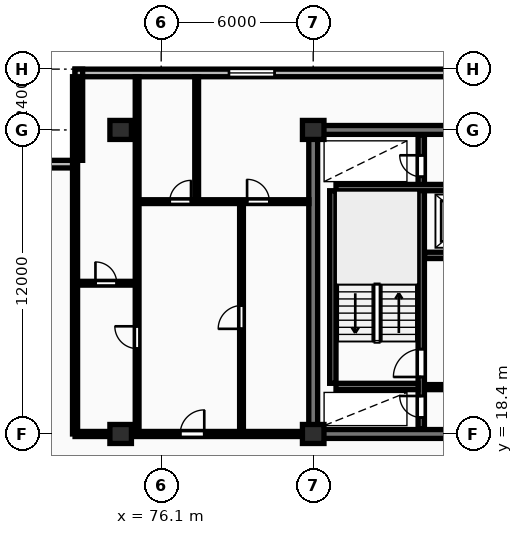
"""IFC4 building model, lengths in metres.
Left out: names, types, materials, properties, quantities, classifications, styles, units other than length and angle.
Written with IfcOpenShell. Run it as: python <this file> out.ifc"""

import sys

from ifc_helpers import new_model, si_unit, direction, frame, frame_2d, origin, origin_2d, place, context, subcontext, project, spatial, rectangle, extrude, element, fill, save


model = new_model("IFC4")
c1 = context("Model", 3, precision=1e-05, world=origin(), true_north=direction((0.0, 1.0)))
c2 = subcontext(c1, "Body", "Model", "MODEL_VIEW")
j1 = project(units=[si_unit("LENGTHUNIT", "METRE"), si_unit("PLANEANGLEUNIT", "RADIAN")], contexts=[c1])
p1 = place(None, origin())
s1 = spatial("IfcSite", under=j1, at=p1, CompositionType="ELEMENT")
p2 = place(p1, origin())
s2 = spatial("IfcBuilding", under=s1, at=p2, CompositionType="ELEMENT")
p3 = place(p2, frame((0.0, 0.0, 87.3)))
s3 = spatial("IfcBuildingStorey", under=s2, at=p3, CompositionType="ELEMENT", Elevation=87.3)
for number, where, z_axis, x_axis in (
    (1, (74.5, 18.4, 0.0), (0.0, 0.0, 1.0), (1.0, 0.0, 0.0)),
    (2, (74.5, 30.4, 0.0), (0.0, 0.0, 1.0), (1.0, 0.0, 0.0)),
    (3, (82.1, 18.4, 0.0), (0.0, 0.0, 1.0), (1.0, 0.0, 0.0)),
    (4, (82.1, 30.4, 0.0), (0.0, 0.0, 1.0), (1.0, 0.0, 0.0)),
):
    element("IfcColumn", number, at=place(p3, frame(where, z_axis=z_axis, x_axis=x_axis)), inside=s3, PredefinedType="COLUMN", context=c2, shape_type="SweptSolid", body=[
        extrude(rectangle(XDim=0.85, YDim=0.75, at=origin_2d()), origin(), (0.0, 0.0, 1.0), 3.25),
    ])
p4 = place(p3, frame((130.7, 32.65, 0.0), z_axis=(0.0, 0.0, 1.0), x_axis=(-1.0, 0.0, 0.0)))
e5 = element("IfcWall", 5, at=p4, inside=s3, PredefinedType="STANDARD", context=c2, shape_type="SweptSolid", body=[
    extrude(rectangle(XDim=58.0, YDim=0.3, at=frame_2d((29.0, 0.0))), origin(), (0.0, 0.0, 1.0), 2.97),
])
p5 = place(p4, frame((50.125, 0.0, 0.85)))
e6 = element("IfcOpeningElement", 6, at=p5, cuts=e5, PredefinedType="OPENING", context=c2, shape_type="SweptSolid", body=[
    extrude(rectangle(XDim=1.8, YDim=1.8, at=frame_2d((0.9, 0.9))), frame((0.0, 0.16, 0.0), z_axis=(0.0, -1.0, 0.0), x_axis=(1.0, 0.0, 0.0)), (0.0, 0.0, 1.0), 0.32),
])
p6 = place(p4, frame((6.775, 0.0, 0.85)))
e7 = element("IfcOpeningElement", 7, at=p6, cuts=e5, PredefinedType="OPENING", context=c2, shape_type="SweptSolid", body=[
    extrude(rectangle(XDim=1.8, YDim=1.8, at=frame_2d((0.9, 0.9))), frame((0.0, 0.16, 0.0), z_axis=(0.0, -1.0, 0.0), x_axis=(1.0, 0.0, 0.0)), (0.0, 0.0, 1.0), 0.32),
])
p7 = place(p3, frame((72.85, 32.8, 0.0), z_axis=(0.0, 0.0, 1.0), x_axis=(0.0, -1.0, 0.0)))
e8 = element("IfcWall", 8, at=p7, inside=s3, PredefinedType="STANDARD", context=c2, shape_type="SweptSolid", body=[
    extrude(rectangle(XDim=3.6, YDim=0.3, at=frame_2d((1.8, 0.0))), origin(), (0.0, 0.0, 1.0), 2.97),
])
p8 = place(p3, frame((72.7, 29.05, 0.0), z_axis=(0.0, 0.0, 1.0), x_axis=(-1.0, 0.0, 0.0)))
e9 = element("IfcWall", 9, at=p8, inside=s3, PredefinedType="STANDARD", context=c2, shape_type="SweptSolid", body=[
    extrude(rectangle(XDim=3.6, YDim=0.3, at=frame_2d((1.8, 0.0))), origin(), (0.0, 0.0, 1.0), 2.97),
])
p9 = place(p3, frame((81.925, 30.4, 0.0), z_axis=(0.0, 0.0, 1.0), x_axis=(1.0, 0.0, 0.0)))
e10 = element("IfcWall", 10, at=p9, inside=s3, PredefinedType="SHEAR", context=c2, shape_type="SweptSolid", body=[
    extrude(rectangle(XDim=36.265, YDim=0.35, at=frame_2d((18.132, 0.0))), origin(), (0.0, 0.0, 1.0), 3.25),
])
p10 = place(p3, frame((82.1, 18.575, 0.0), z_axis=(0.0, 0.0, 1.0), x_axis=(0.0, 1.0, 0.0)))
e11 = element("IfcWall", 11, at=p10, inside=s3, PredefinedType="SHEAR", context=c2, shape_type="SweptSolid", body=[
    extrude(rectangle(XDim=11.65, YDim=0.35, at=frame_2d((5.825, 0.0))), origin(), (0.0, 0.0, 1.0), 3.25),
])
p11 = place(p3, frame((81.925, 18.4, 0.0), z_axis=(0.0, 0.0, 1.0), x_axis=(1.0, 0.0, 0.0)))
e12 = element("IfcWall", 12, at=p11, inside=s3, PredefinedType="SHEAR", context=c2, shape_type="SweptSolid", body=[
    extrude(rectangle(XDim=36.265, YDim=0.35, at=frame_2d((18.132, 0.0))), origin(), (0.0, 0.0, 1.0), 3.25),
])
p12 = place(p11, frame((5.675, 0.0, 0.0)))
e13 = element("IfcOpeningElement", 13, at=p12, cuts=e12, PredefinedType="OPENING", context=c2, shape_type="SweptSolid", body=[
    extrude(rectangle(XDim=1.0, YDim=2.15, at=frame_2d((0.5, 1.075))), frame((0.0, 0.185, 0.0), z_axis=(0.0, -1.0, 0.0), x_axis=(1.0, 0.0, 0.0)), (0.0, 0.0, 1.0), 0.37),
])
p13 = place(p11, frame((21.925, 0.0, 0.0)))
e14 = element("IfcOpeningElement", 14, at=p13, cuts=e12, PredefinedType="OPENING", context=c2, shape_type="SweptSolid", body=[
    extrude(rectangle(XDim=1.5, YDim=2.2, at=frame_2d((0.75, 1.1))), frame((0.0, 0.185, 0.0), z_axis=(0.0, -1.0, 0.0), x_axis=(1.0, 0.0, 0.0)), (0.0, 0.0, 1.0), 0.37),
])
p14 = place(p11, frame((29.875, 0.0, 0.0)))
e15 = element("IfcOpeningElement", 15, at=p14, cuts=e12, PredefinedType="OPENING", context=c2, shape_type="SweptSolid", body=[
    extrude(rectangle(XDim=1.0, YDim=2.15, at=frame_2d((0.5, 1.075))), frame((0.0, 0.185, 0.0), z_axis=(0.0, -1.0, 0.0), x_axis=(1.0, 0.0, 0.0)), (0.0, 0.0, 1.0), 0.37),
])
p15 = place(p3, frame((82.875, 20.4, 0.0), z_axis=(0.0, 0.0, 1.0), x_axis=(0.0, 1.0, 0.0)))
e16 = element("IfcWall", 16, at=p15, inside=s3, PredefinedType="SHEAR", context=c2, shape_type="SweptSolid", body=[
    extrude(rectangle(XDim=7.6, YDim=0.25, at=frame_2d((3.8, 0.0))), origin(), (0.0, 0.0, 1.0), 3.25),
])
p16 = place(p3, frame((86.365, 18.6, 0.0), z_axis=(0.0, 0.0, 1.0), x_axis=(0.0, 1.0, 0.0)))
e17 = element("IfcWall", 17, at=p16, inside=s3, PredefinedType="SHEAR", context=c2, shape_type="SweptSolid", body=[
    extrude(rectangle(XDim=11.6, YDim=0.25, at=frame_2d((5.8, 0.0))), origin(), (0.0, 0.0, 1.0), 3.25),
])
p17 = place(p16, frame((0.45, 0.0, 0.0)))
e18 = element("IfcOpeningElement", 18, at=p17, cuts=e17, PredefinedType="OPENING", context=c2, shape_type="SweptSolid", body=[
    extrude(rectangle(XDim=0.85, YDim=2.05, at=frame_2d((0.425, 1.025))), frame((0.0, 0.135, 0.0), z_axis=(0.0, -1.0, 0.0), x_axis=(1.0, 0.0, 0.0)), (0.0, 0.0, 1.0), 0.27),
])
p18 = place(p16, frame((2.05, 0.0, 0.0)))
e19 = element("IfcOpeningElement", 19, at=p18, cuts=e17, PredefinedType="OPENING", context=c2, shape_type="SweptSolid", body=[
    extrude(rectangle(XDim=1.1, YDim=2.1, at=frame_2d((0.55, 1.05))), frame((0.0, 0.135, 0.0), z_axis=(0.0, -1.0, 0.0), x_axis=(1.0, 0.0, 0.0)), (0.0, 0.0, 1.0), 0.27),
])
p19 = place(p16, frame((9.95, 0.0, 0.0)))
e20 = element("IfcOpeningElement", 20, at=p19, cuts=e17, PredefinedType="OPENING", context=c2, shape_type="SweptSolid", body=[
    extrude(rectangle(XDim=0.85, YDim=2.05, at=frame_2d((0.425, 1.025))), frame((0.0, 0.135, 0.0), z_axis=(0.0, -1.0, 0.0), x_axis=(1.0, 0.0, 0.0)), (0.0, 0.0, 1.0), 0.27),
])
p20 = place(p3, frame((83.0, 20.275, 0.0), z_axis=(0.0, 0.0, 1.0), x_axis=(1.0, 0.0, 0.0)))
e21 = element("IfcWall", 21, at=p20, inside=s3, PredefinedType="SHEAR", context=c2, shape_type="SweptSolid", body=[
    extrude(rectangle(XDim=3.24, YDim=0.25, at=frame_2d((1.62, 0.0))), origin(), (0.0, 0.0, 1.0), 3.25),
])
p21 = place(p3, frame((83.0, 28.125, 0.0), z_axis=(0.0, 0.0, 1.0), x_axis=(1.0, 0.0, 0.0)))
e22 = element("IfcWall", 22, at=p21, inside=s3, PredefinedType="SHEAR", context=c2, shape_type="SweptSolid", body=[
    extrude(rectangle(XDim=7.82, YDim=0.25, at=frame_2d((3.91, 0.0))), origin(), (0.0, 0.0, 1.0), 3.25),
])
p22 = place(p3, frame((86.5, 25.45, 0.0), z_axis=(0.0, 0.0, 1.0), x_axis=(1.0, 0.0, 0.0)))
e23 = element("IfcWall", 23, at=p22, inside=s3, PredefinedType="SHEAR", context=c2, shape_type="SweptSolid", body=[
    extrude(rectangle(XDim=4.32, YDim=0.25, at=frame_2d((2.16, 0.0))), origin(), (0.0, 0.0, 1.0), 3.25),
])
p23 = place(p22, frame((1.14, 0.0, 0.0)))
e24 = element("IfcOpeningElement", 24, at=p23, cuts=e23, PredefinedType="OPENING", context=c2, shape_type="SweptSolid", body=[
    extrude(rectangle(XDim=1.12, YDim=2.12, at=frame_2d((0.56, 1.06))), frame((0.0, 0.135, 0.0), z_axis=(0.0, -1.0, 0.0), x_axis=(1.0, 0.0, 0.0)), (0.0, 0.0, 1.0), 0.27),
])
p24 = place(p22, frame((3.25, 0.0, 0.0)))
e25 = element("IfcOpeningElement", 25, at=p24, cuts=e23, PredefinedType="OPENING", context=c2, shape_type="SweptSolid", body=[
    extrude(rectangle(XDim=0.85, YDim=2.05, at=frame_2d((0.425, 1.025))), frame((0.0, 0.135, 0.0), z_axis=(0.0, -1.0, 0.0), x_axis=(1.0, 0.0, 0.0)), (0.0, 0.0, 1.0), 0.27),
])
p25 = place(p3, frame((86.5, 20.25, 0.0), z_axis=(0.0, 0.0, 1.0), x_axis=(1.0, 0.0, 0.0)))
e26 = element("IfcWall", 26, at=p25, inside=s3, PredefinedType="PARTITIONING", context=c2, shape_type="SweptSolid", body=[
    extrude(rectangle(XDim=4.32, YDim=0.2, at=frame_2d((2.16, 0.0))), origin(), (0.0, 0.0, 1.0), 2.97),
])
p26 = place(p25, frame((1.4, 0.0, 0.0)))
e27 = element("IfcOpeningElement", 27, at=p26, cuts=e26, PredefinedType="OPENING", context=c2, shape_type="SweptSolid", body=[
    extrude(rectangle(XDim=1.1, YDim=2.1, at=frame_2d((0.55, 1.05))), frame((0.0, 0.11, 0.0), z_axis=(0.0, -1.0, 0.0), x_axis=(1.0, 0.0, 0.0)), (0.0, 0.0, 1.0), 0.22),
])
p27 = place(p3, frame((72.7, 18.4, 0.0), z_axis=(0.0, 0.0, 1.0), x_axis=(0.0, 1.0, 0.0)))
e28 = element("IfcWall", 28, at=p27, inside=s3, PredefinedType="PARTITIONING", context=c2, shape_type="SweptSolid", body=[
    extrude(rectangle(XDim=14.1, YDim=0.2, at=frame_2d((7.05, 0.0))), origin(), (0.0, 0.0, 1.0), 2.97),
])
p28 = place(p3, frame((72.7, 24.35, 0.0), z_axis=(0.0, 0.0, 1.0), x_axis=(1.0, 0.0, 0.0)))
e29 = element("IfcWall", 29, at=p28, inside=s3, PredefinedType="PARTITIONING", context=c2, shape_type="SweptSolid", body=[
    extrude(rectangle(XDim=2.45, YDim=0.15, at=frame_2d((1.225, 0.0))), origin(), (0.0, 0.0, 1.0), 2.97),
])
p29 = place(p28, frame((0.805, 0.0, 0.0)))
e30 = element("IfcOpeningElement", 30, at=p29, cuts=e29, PredefinedType="OPENING", context=c2, shape_type="SweptSolid", body=[
    extrude(rectangle(XDim=0.84, YDim=2.04, at=frame_2d((0.42, 1.02))), frame((0.0, 0.085, 0.0), z_axis=(0.0, -1.0, 0.0), x_axis=(1.0, 0.0, 0.0)), (0.0, 0.0, 1.0), 0.17),
])
p30 = place(p3, frame((75.15, 18.45, 0.0), z_axis=(0.0, 0.0, 1.0), x_axis=(0.0, 1.0, 0.0)))
e31 = element("IfcWall", 31, at=p30, inside=s3, PredefinedType="PARTITIONING", context=c2, shape_type="SweptSolid", body=[
    extrude(rectangle(XDim=14.05, YDim=0.15, at=frame_2d((7.025, 0.0))), origin(), (0.0, 0.0, 1.0), 2.97),
])
p31 = place(p30, frame((3.32, 0.0, 0.0)))
e32 = element("IfcOpeningElement", 32, at=p31, cuts=e31, PredefinedType="OPENING", context=c2, shape_type="SweptSolid", body=[
    extrude(rectangle(XDim=0.88, YDim=2.06, at=frame_2d((0.44, 1.03))), frame((0.0, 0.085, 0.0), z_axis=(0.0, -1.0, 0.0), x_axis=(1.0, 0.0, 0.0)), (0.0, 0.0, 1.0), 0.17),
])
p32 = place(p3, frame((79.27, 18.45, 0.0), z_axis=(0.0, 0.0, 1.0), x_axis=(0.0, 1.0, 0.0)))
e33 = element("IfcWall", 33, at=p32, inside=s3, PredefinedType="PARTITIONING", context=c2, shape_type="SweptSolid", body=[
    extrude(rectangle(XDim=9.12, YDim=0.15, at=frame_2d((4.56, 0.0))), origin(), (0.0, 0.0, 1.0), 2.97),
])
p33 = place(p32, frame((4.1, 0.0, 0.0)))
e34 = element("IfcOpeningElement", 34, at=p33, cuts=e33, PredefinedType="OPENING", context=c2, shape_type="SweptSolid", body=[
    extrude(rectangle(XDim=0.92, YDim=2.08, at=frame_2d((0.46, 1.04))), frame((0.0, 0.085, 0.0), z_axis=(0.0, -1.0, 0.0), x_axis=(1.0, 0.0, 0.0)), (0.0, 0.0, 1.0), 0.17),
])
p34 = place(p3, frame((77.5, 27.57, 0.0), z_axis=(0.0, 0.0, 1.0), x_axis=(0.0, 1.0, 0.0)))
e35 = element("IfcWall", 35, at=p34, inside=s3, PredefinedType="PARTITIONING", context=c2, shape_type="SweptSolid", body=[
    extrude(rectangle(XDim=4.93, YDim=0.15, at=frame_2d((2.465, 0.0))), origin(), (0.0, 0.0, 1.0), 2.97),
])
p35 = place(p3, frame((75.17, 27.57, 0.0), z_axis=(0.0, 0.0, 1.0), x_axis=(1.0, 0.0, 0.0)))
e36 = element("IfcWall", 36, at=p35, inside=s3, PredefinedType="PARTITIONING", context=c2, shape_type="SweptSolid", body=[
    extrude(rectangle(XDim=6.76, YDim=0.15, at=frame_2d((3.38, 0.0))), origin(), (0.0, 0.0, 1.0), 2.97),
])
p36 = place(p35, frame((1.266, 0.0, 0.0)))
e37 = element("IfcOpeningElement", 37, at=p36, cuts=e36, PredefinedType="OPENING", context=c2, shape_type="SweptSolid", body=[
    extrude(rectangle(XDim=0.84, YDim=2.04, at=frame_2d((0.42, 1.02))), frame((0.0, 0.085, 0.0), z_axis=(0.0, -1.0, 0.0), x_axis=(1.0, 0.0, 0.0)), (0.0, 0.0, 1.0), 0.17),
])
p37 = place(p35, frame((4.32, 0.0, 0.0)))
e38 = element("IfcOpeningElement", 38, at=p37, cuts=e36, PredefinedType="OPENING", context=c2, shape_type="SweptSolid", body=[
    extrude(rectangle(XDim=0.88, YDim=2.06, at=frame_2d((0.44, 1.03))), frame((0.0, 0.085, 0.0), z_axis=(0.0, -1.0, 0.0), x_axis=(1.0, 0.0, 0.0)), (0.0, 0.0, 1.0), 0.17),
])
p38 = place(p3, frame((72.7, 18.4, 0.0), z_axis=(0.0, 0.0, 1.0), x_axis=(1.0, 0.0, 0.0)))
e39 = element("IfcWall", 39, at=p38, inside=s3, PredefinedType="PARTITIONING", context=c2, shape_type="SweptSolid", body=[
    extrude(rectangle(XDim=9.25, YDim=0.2, at=frame_2d((4.625, 0.0))), origin(), (0.0, 0.0, 1.0), 2.358),
])
p39 = place(p38, frame((4.15, 0.0, 0.0)))
e40 = element("IfcOpeningElement", 40, at=p39, cuts=e39, PredefinedType="OPENING", context=c2, shape_type="SweptSolid", body=[
    extrude(rectangle(XDim=0.95, YDim=2.15, at=frame_2d((0.475, 1.075))), frame((0.0, 0.11, 0.0), z_axis=(0.0, -1.0, 0.0), x_axis=(1.0, 0.0, 0.0)), (0.0, 0.0, 1.0), 0.22),
])
p40 = place(p5, origin())
e41 = element("IfcWindow", 41, at=p40, inside=s3, PartitioningType="SINGLE_PANEL", PredefinedType="WINDOW", context=c2, shape_type="SweptSolid", body=[
    extrude(rectangle(XDim=1.8, YDim=1.8, at=frame_2d((0.9, 0.9))), frame((0.0, 0.03, 0.0), z_axis=(0.0, -1.0, 0.0), x_axis=(1.0, 0.0, 0.0)), (0.0, 0.0, 1.0), 0.06),
])
fill(e6, e41)
p41 = place(p17, origin())
e42 = element("IfcDoor", 42, at=p41, inside=s3, OperationType="SINGLE_SWING_RIGHT", PredefinedType="DOOR", context=c2, shape_type="SweptSolid", body=[
    extrude(rectangle(XDim=0.85, YDim=2.05, at=frame_2d((0.425, 1.025))), frame((0.0, 0.025, 0.0), z_axis=(0.0, -1.0, 0.0), x_axis=(1.0, 0.0, 0.0)), (0.0, 0.0, 1.0), 0.05),
])
fill(e18, e42)
p42 = place(p18, origin())
e43 = element("IfcDoor", 43, at=p42, inside=s3, OperationType="SINGLE_SWING_LEFT", PredefinedType="DOOR", context=c2, shape_type="SweptSolid", body=[
    extrude(rectangle(XDim=1.1, YDim=2.1, at=frame_2d((0.55, 1.05))), frame((0.0, 0.025, 0.0), z_axis=(0.0, -1.0, 0.0), x_axis=(1.0, 0.0, 0.0)), (0.0, 0.0, 1.0), 0.05),
])
fill(e19, e43)
p43 = place(p19, origin())
e44 = element("IfcDoor", 44, at=p43, inside=s3, OperationType="SINGLE_SWING_RIGHT", PredefinedType="DOOR", context=c2, shape_type="SweptSolid", body=[
    extrude(rectangle(XDim=0.85, YDim=2.05, at=frame_2d((0.425, 1.025))), frame((0.0, 0.025, 0.0), z_axis=(0.0, -1.0, 0.0), x_axis=(1.0, 0.0, 0.0)), (0.0, 0.0, 1.0), 0.05),
])
fill(e20, e44)
p44 = place(p29, origin())
e45 = element("IfcDoor", 45, at=p44, inside=s3, OperationType="SINGLE_SWING_LEFT", PredefinedType="DOOR", context=c2, shape_type="SweptSolid", body=[
    extrude(rectangle(XDim=0.84, YDim=2.04, at=frame_2d((0.42, 1.02))), frame((0.0, 0.025, 0.0), z_axis=(0.0, -1.0, 0.0), x_axis=(1.0, 0.0, 0.0)), (0.0, 0.0, 1.0), 0.05),
])
fill(e30, e45)
p45 = place(p31, origin())
e46 = element("IfcDoor", 46, at=p45, inside=s3, OperationType="SINGLE_SWING_RIGHT", PredefinedType="DOOR", context=c2, shape_type="SweptSolid", body=[
    extrude(rectangle(XDim=0.88, YDim=2.06, at=frame_2d((0.44, 1.03))), frame((0.0, 0.025, 0.0), z_axis=(0.0, -1.0, 0.0), x_axis=(1.0, 0.0, 0.0)), (0.0, 0.0, 1.0), 0.05),
])
fill(e32, e46)
p46 = place(p33, origin())
e47 = element("IfcDoor", 47, at=p46, inside=s3, OperationType="SINGLE_SWING_LEFT", PredefinedType="DOOR", context=c2, shape_type="SweptSolid", body=[
    extrude(rectangle(XDim=0.92, YDim=2.08, at=frame_2d((0.46, 1.04))), frame((0.0, 0.025, 0.0), z_axis=(0.0, -1.0, 0.0), x_axis=(1.0, 0.0, 0.0)), (0.0, 0.0, 1.0), 0.05),
])
fill(e34, e47)
p47 = place(p36, origin())
e48 = element("IfcDoor", 48, at=p47, inside=s3, OperationType="SINGLE_SWING_RIGHT", PredefinedType="DOOR", context=c2, shape_type="SweptSolid", body=[
    extrude(rectangle(XDim=0.84, YDim=2.04, at=frame_2d((0.42, 1.02))), frame((0.0, 0.025, 0.0), z_axis=(0.0, -1.0, 0.0), x_axis=(1.0, 0.0, 0.0)), (0.0, 0.0, 1.0), 0.05),
])
fill(e37, e48)
p48 = place(p37, origin())
e49 = element("IfcDoor", 49, at=p48, inside=s3, OperationType="SINGLE_SWING_LEFT", PredefinedType="DOOR", context=c2, shape_type="SweptSolid", body=[
    extrude(rectangle(XDim=0.88, YDim=2.06, at=frame_2d((0.44, 1.03))), frame((0.0, 0.025, 0.0), z_axis=(0.0, -1.0, 0.0), x_axis=(1.0, 0.0, 0.0)), (0.0, 0.0, 1.0), 0.05),
])
fill(e38, e49)
p49 = place(p39, origin())
e50 = element("IfcDoor", 50, at=p49, inside=s3, OperationType="SINGLE_SWING_RIGHT", PredefinedType="DOOR", context=c2, shape_type="SweptSolid", body=[
    extrude(rectangle(XDim=0.95, YDim=2.15, at=frame_2d((0.475, 1.075))), frame((0.0, 0.025, 0.0), z_axis=(0.0, -1.0, 0.0), x_axis=(1.0, 0.0, 0.0)), (0.0, 0.0, 1.0), 0.05),
])
fill(e40, e50)
save(model, sys.argv[1])
